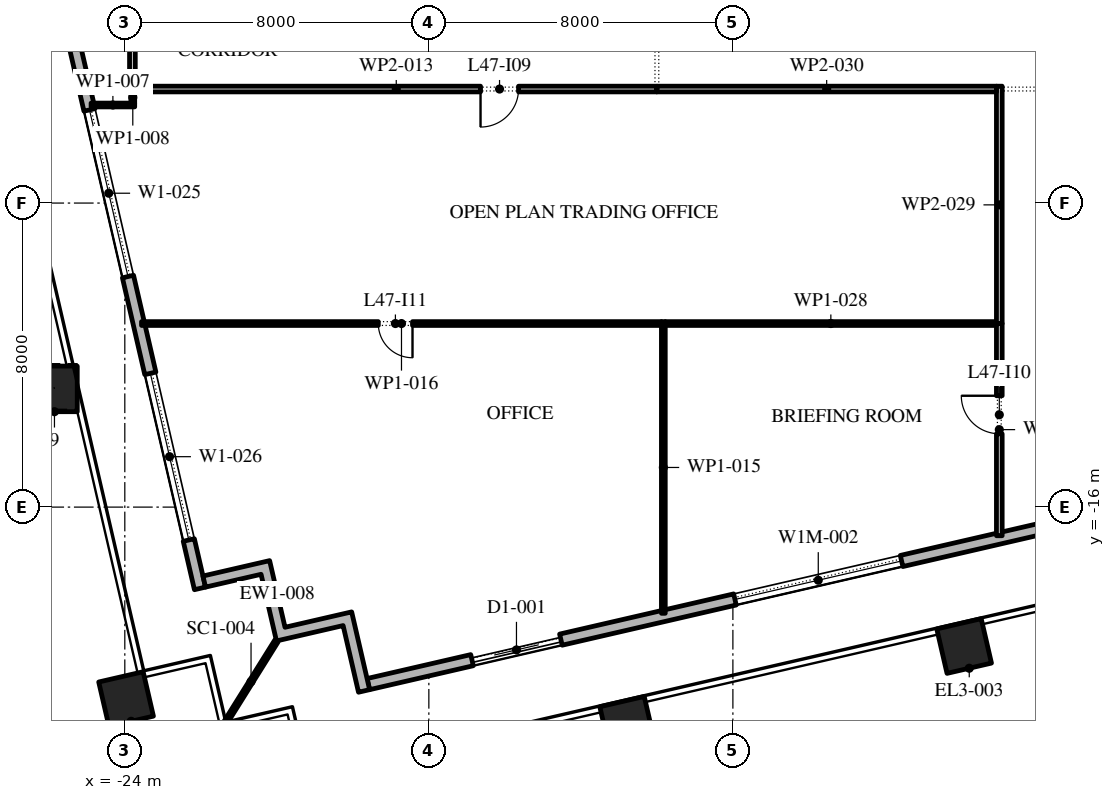
"""IFC4 building model, lengths in metres.
Left out: names, types, materials, properties, quantities, classifications, styles, units other than length and angle.
Written with IfcOpenShell. Run it as: python <this file> out.ifc"""

import sys

from ifc_helpers import new_model, si_unit, direction, frame, frame_2d, origin, origin_2d, place, context, subcontext, project, spatial, polyline, rectangle, outline, extrude, element, fill, save


model = new_model("IFC4")
c1 = context("Model", 3, precision=1e-05, world=origin(), true_north=direction((0.0, 1.0)))
c2 = subcontext(c1, "Body", "Model", "MODEL_VIEW")
j1 = project(units=[si_unit("LENGTHUNIT", "METRE"), si_unit("PLANEANGLEUNIT", "RADIAN")], contexts=[c1])
p1 = place(None, origin())
s1 = spatial("IfcSite", under=j1, at=p1, CompositionType="ELEMENT")
p2 = place(p1, origin())
s2 = spatial("IfcBuilding", under=s1, at=p2, CompositionType="ELEMENT")
p3 = place(p2, frame((0.0, 0.0, 213.6)))
s3 = spatial("IfcBuildingStorey", under=s2, at=p3, CompositionType="ELEMENT", Elevation=213.6)
for number, where, z_axis, x_axis in (
    (1, (-10.782, -21.702, 0.0), (0.0, 0.0, 1.0), (0.974, 0.225, 0.0)),
    (2, (-1.916, -19.655, 0.0), (0.0, 0.0, 1.0), (0.974, 0.225, 0.0)),
):
    element("IfcColumn", number, at=place(p3, frame(where, z_axis=z_axis, x_axis=x_axis)), inside=s3, PredefinedType="COLUMN", context=c2, shape_type="SweptSolid", body=[
        extrude(rectangle(XDim=1.2, YDim=1.2, at=origin_2d()), origin(), (0.0, 0.0, 1.0), 4.2),
    ])
p4 = place(p3, frame((-25.851, -12.89, 0.0), z_axis=(-0.002731884952, 0.01168316756, 0.999928017609), x_axis=(-0.973733900744, -0.227689021567, 0.0)))
e3 = element("IfcColumn", 3, at=p4, inside=s3, PredefinedType="COLUMN", context=c2, shape_type="SweptSolid", body=[
    extrude(rectangle(XDim=1.2, YDim=1.2, at=origin_2d()), origin(), (0.0, 0.0, 1.0), 4.2),
])
p5 = place(p3, frame((-23.967, -21.051, 0.0), z_axis=(0.0, 0.0, 1.0), x_axis=(0.974370064785, 0.224951054344, 0.0)))
e4 = element("IfcColumn", 4, at=p5, inside=s3, PredefinedType="COLUMN", context=c2, shape_type="SweptSolid", body=[
    extrude(rectangle(XDim=1.2, YDim=1.2, at=origin_2d()), origin(), (0.0, 0.0, 1.0), 4.2),
])
p6 = place(p3, frame((-17.592, -20.657, 0.0), z_axis=(0.0, 0.0, 1.0), x_axis=(0.974370243697, 0.224950279389, 0.0)))
e5 = element("IfcWall", 5, at=p6, inside=s3, PredefinedType="STANDARD", context=c2, shape_type="SweptSolid", body=[
    extrude(rectangle(XDim=49.5, YDim=0.3, at=frame_2d((24.75, 0.0))), origin(), (0.0, 0.0, 1.0), 4.0),
])
p7 = place(p6, frame((2.8, 0.0, 0.0)))
e6 = element("IfcOpeningElement", 6, at=p7, cuts=e5, PredefinedType="OPENING", context=c2, shape_type="SweptSolid", body=[
    extrude(rectangle(XDim=2.4, YDim=3.5, at=frame_2d((1.2, 1.75))), frame((0.0, 0.16, 0.0), z_axis=(0.0, -1.0, 0.0), x_axis=(1.0, 0.0, 0.0)), (0.0, 0.0, 1.0), 0.32),
])
p8 = place(p6, frame((9.9, 0.0, 0.45)))
e7 = element("IfcOpeningElement", 7, at=p8, cuts=e5, PredefinedType="OPENING", context=c2, shape_type="SweptSolid", body=[
    extrude(rectangle(XDim=4.5, YDim=2.575, at=frame_2d((2.25, 1.288))), frame((0.0, 0.16, 0.0), z_axis=(0.0, -1.0, 0.0), x_axis=(1.0, 0.0, 0.0)), (0.0, 0.0, 1.0), 0.32),
])
p9 = place(p6, frame((18.2, 0.0, 0.45)))
e8 = element("IfcOpeningElement", 8, at=p9, cuts=e5, PredefinedType="OPENING", context=c2, shape_type="SweptSolid", body=[
    extrude(rectangle(XDim=4.5, YDim=2.675, at=frame_2d((2.25, 1.337))), frame((0.0, 0.16, 0.0), z_axis=(0.0, -1.0, 0.0), x_axis=(1.0, 0.0, 0.0)), (0.0, 0.0, 1.0), 0.32),
])
p10 = place(p6, frame((26.5, 0.0, 0.45)))
e9 = element("IfcOpeningElement", 9, at=p10, cuts=e5, PredefinedType="OPENING", context=c2, shape_type="SweptSolid", body=[
    extrude(rectangle(XDim=4.5, YDim=2.75, at=frame_2d((2.25, 1.375))), frame((0.0, 0.16, 0.0), z_axis=(0.0, -1.0, 0.0), x_axis=(1.0, 0.0, 0.0)), (0.0, 0.0, 1.0), 0.32),
])
p11 = place(p6, frame((36.8, 0.0, 0.0)))
e10 = element("IfcOpeningElement", 10, at=p11, cuts=e5, PredefinedType="OPENING", context=c2, shape_type="SweptSolid", body=[
    extrude(rectangle(XDim=2.4, YDim=3.275, at=frame_2d((1.2, 1.637))), frame((0.0, 0.16, 0.0), z_axis=(0.0, -1.0, 0.0), x_axis=(1.0, 0.0, 0.0)), (0.0, 0.0, 1.0), 0.32),
])
p12 = place(p6, frame((43.1, 0.0, 0.45)))
e11 = element("IfcOpeningElement", 11, at=p12, cuts=e5, PredefinedType="OPENING", context=c2, shape_type="SweptSolid", body=[
    extrude(rectangle(XDim=4.5, YDim=2.875, at=frame_2d((2.25, 1.438))), frame((0.0, 0.16, 0.0), z_axis=(0.0, -1.0, 0.0), x_axis=(1.0, 0.0, 0.0)), (0.0, 0.0, 1.0), 0.32),
])
p13 = place(p3, frame((-33.157, 30.092, 0.0), z_axis=(0.0, 0.0, 1.0), x_axis=(0.224950279389, -0.974370243697, 0.0)))
e12 = element("IfcWall", 12, at=p13, inside=s3, PredefinedType="STANDARD", context=c2, shape_type="SweptSolid", body=[
    extrude(rectangle(XDim=49.5, YDim=0.3, at=frame_2d((24.75, 0.0))), origin(), (0.0, 0.0, 1.0), 4.0),
])
p14 = place(p13, frame((2.207, 0.0, 0.0)))
e13 = element("IfcOpeningElement", 13, at=p14, cuts=e12, PredefinedType="OPENING", context=c2, shape_type="SweptSolid", body=[
    extrude(rectangle(XDim=2.4, YDim=3.5, at=frame_2d((1.2, 1.75))), frame((0.0, 0.16, 0.0), z_axis=(0.0, -1.0, 0.0), x_axis=(1.0, 0.0, 0.0)), (0.0, 0.0, 1.0), 0.32),
])
p15 = place(p13, frame((8.121, 0.0, 0.45)))
e14 = element("IfcOpeningElement", 14, at=p15, cuts=e12, PredefinedType="OPENING", context=c2, shape_type="SweptSolid", body=[
    extrude(rectangle(XDim=4.5, YDim=2.825, at=frame_2d((2.25, 1.413))), frame((0.0, 0.16, 0.0), z_axis=(0.0, -1.0, 0.0), x_axis=(1.0, 0.0, 0.0)), (0.0, 0.0, 1.0), 0.32),
])
p16 = place(p13, frame((15.236, 0.0, 0.45)))
e15 = element("IfcOpeningElement", 15, at=p16, cuts=e12, PredefinedType="OPENING", context=c2, shape_type="SweptSolid", body=[
    extrude(rectangle(XDim=4.5, YDim=2.95, at=frame_2d((2.25, 1.475))), frame((0.0, 0.16, 0.0), z_axis=(0.0, -1.0, 0.0), x_axis=(1.0, 0.0, 0.0)), (0.0, 0.0, 1.0), 0.32),
])
p17 = place(p13, frame((22.35, 0.0, 0.45)))
e16 = element("IfcOpeningElement", 16, at=p17, cuts=e12, PredefinedType="OPENING", context=c2, shape_type="SweptSolid", body=[
    extrude(rectangle(XDim=4.5, YDim=3.0, at=frame_2d((2.25, 1.5))), frame((0.0, 0.16, 0.0), z_axis=(0.0, -1.0, 0.0), x_axis=(1.0, 0.0, 0.0)), (0.0, 0.0, 1.0), 0.32),
])
p18 = place(p13, frame((30.514, 0.0, 0.0)))
e17 = element("IfcOpeningElement", 17, at=p18, cuts=e12, PredefinedType="OPENING", context=c2, shape_type="SweptSolid", body=[
    extrude(rectangle(XDim=2.4, YDim=3.5, at=frame_2d((1.2, 1.75))), frame((0.0, 0.16, 0.0), z_axis=(0.0, -1.0, 0.0), x_axis=(1.0, 0.0, 0.0)), (0.0, 0.0, 1.0), 0.32),
])
p19 = place(p13, frame((36.579, 0.0, 0.45)))
e18 = element("IfcOpeningElement", 18, at=p19, cuts=e12, PredefinedType="OPENING", context=c2, shape_type="SweptSolid", body=[
    extrude(rectangle(XDim=4.5, YDim=3.05, at=frame_2d((2.25, 1.525))), frame((0.0, 0.16, 0.0), z_axis=(0.0, -1.0, 0.0), x_axis=(1.0, 0.0, 0.0)), (0.0, 0.0, 1.0), 0.32),
])
p20 = place(p13, frame((43.693, 0.0, 0.45)))
e19 = element("IfcOpeningElement", 19, at=p20, cuts=e12, PredefinedType="OPENING", context=c2, shape_type="SweptSolid", body=[
    extrude(rectangle(XDim=4.5, YDim=3.05, at=frame_2d((2.25, 1.525))), frame((0.0, 0.16, 0.0), z_axis=(0.0, -1.0, 0.0), x_axis=(1.0, 0.0, 0.0)), (0.0, 0.0, 1.0), 0.32),
])
p21 = place(p3, origin())
e20 = element("IfcWall", 20, at=p21, inside=s3, PredefinedType="STANDARD", context=c2, shape_type="SweptSolid", body=[
    extrude(outline(polyline([(-18.256, -19.117), (-20.01, -19.522), (-20.414, -17.768), (-21.876, -18.105), (-21.943, -17.813), (-20.19, -17.408), (-19.785, -19.162), (-18.031, -18.757), (-17.558, -20.803), (-17.851, -20.871), (-18.256, -19.117)])), origin(), (0.0, 0.0, 1.0), 4.0),
])
p22 = place(p3, frame((-20.01, -19.522, -0.05), z_axis=(0.0, 0.0, 1.0), x_axis=(-0.529920736377, -0.848047176257, 0.0)))
e21 = element("IfcWall", 21, at=p22, inside=s3, PredefinedType="STANDARD", context=c2, shape_type="SweptSolid", body=[
    extrude(rectangle(XDim=2.526, YDim=0.1, at=frame_2d((1.263, 0.0))), origin(), (0.0, 0.0, 1.0), 4.05),
])
p23 = place(p3, frame((-23.8, -5.075, 0.0), z_axis=(0.0, 0.0, 1.0), x_axis=(0.0, 1.0, 0.0)))
e22 = element("IfcWall", 22, at=p23, inside=s3, PredefinedType="PARTITIONING", context=c2, shape_type="SweptSolid", body=[
    extrude(rectangle(XDim=13.525, YDim=0.15, at=frame_2d((6.762, 0.0))), origin(), (0.0, 0.0, 1.0), 4.0),
])
p24 = place(p23, frame((7.625, 0.0, 0.0)))
e23 = element("IfcOpeningElement", 23, at=p24, cuts=e22, PredefinedType="OPENING", context=c2, shape_type="SweptSolid", body=[
    extrude(rectangle(XDim=1.0, YDim=2.1, at=frame_2d((0.5, 1.05))), frame((0.0, 0.085, 0.0), z_axis=(0.0, -1.0, 0.0), x_axis=(1.0, 0.0, 0.0)), (0.0, 0.0, 1.0), 0.17),
])
p25 = place(p3, frame((-23.74, -5.42, 0.0), z_axis=(0.0, 0.0, 1.0), x_axis=(-1.0, 0.0, 0.0)))
e24 = element("IfcWall", 24, at=p25, inside=s3, PredefinedType="PARTITIONING", context=c2, shape_type="SweptSolid", body=[
    extrude(rectangle(XDim=1.147, YDim=0.1, at=frame_2d((0.573, 0.0))), origin(), (0.0, 0.0, 1.0), 4.0),
])
p26 = place(p3, frame((-23.79, -5.075, 0.0), z_axis=(0.0, 0.0, 1.0), x_axis=(0.0, -1.0, 0.0)))
e25 = element("IfcWall", 25, at=p26, inside=s3, PredefinedType="PARTITIONING", context=c2, shape_type="SweptSolid", body=[
    extrude(rectangle(XDim=0.295, YDim=0.1, at=frame_2d((0.147, 0.0))), origin(), (0.0, 0.0, 1.0), 4.0),
])
p27 = place(p3, frame((-10.0, -5.0, 0.0), z_axis=(0.0, 0.0, 1.0), x_axis=(-1.0, 0.0, 0.0)))
e26 = element("IfcWall", 26, at=p27, inside=s3, PredefinedType="PARTITIONING", context=c2, shape_type="SweptSolid", body=[
    extrude(rectangle(XDim=13.715, YDim=0.15, at=frame_2d((6.857, 0.0))), origin(), (0.0, 0.0, 1.0), 4.0),
])
p28 = place(p27, frame((3.64, 0.0, 0.0)))
e27 = element("IfcOpeningElement", 27, at=p28, cuts=e26, PredefinedType="OPENING", context=c2, shape_type="SweptSolid", body=[
    extrude(rectangle(XDim=1.0, YDim=2.1, at=frame_2d((0.5, 1.05))), frame((0.0, 0.085, 0.0), z_axis=(0.0, -1.0, 0.0), x_axis=(1.0, 0.0, 0.0)), (0.0, 0.0, 1.0), 0.17),
])
p29 = place(p3, frame((-9.83, -18.794, 0.0), z_axis=(0.0, 0.0, 1.0), x_axis=(0.0, 1.0, 0.0)))
e28 = element("IfcWall", 28, at=p29, inside=s3, PredefinedType="PARTITIONING", context=c2, shape_type="SweptSolid", body=[
    extrude(rectangle(XDim=7.674, YDim=0.1, at=frame_2d((3.837, 0.0))), origin(), (0.0, 0.0, 1.0), 4.0),
])
p30 = place(p3, frame((-9.88, -11.17, 0.0), z_axis=(0.0, 0.0, 1.0), x_axis=(-1.0, 0.0, 0.0)))
e29 = element("IfcWall", 29, at=p30, inside=s3, PredefinedType="PARTITIONING", context=c2, shape_type="SweptSolid", body=[
    extrude(rectangle(XDim=13.68, YDim=0.1, at=frame_2d((6.84, 0.0))), origin(), (0.0, 0.0, 1.0), 4.0),
])
p31 = place(p30, frame((6.55, 0.0, 0.0)))
e30 = element("IfcOpeningElement", 30, at=p31, cuts=e29, PredefinedType="OPENING", context=c2, shape_type="SweptSolid", body=[
    extrude(rectangle(XDim=0.9, YDim=2.1, at=frame_2d((0.45, 1.05))), frame((0.0, 0.06, 0.0), z_axis=(0.0, -1.0, 0.0), x_axis=(1.0, 0.0, 0.0)), (0.0, 0.0, 1.0), 0.12),
])
p32 = place(p3, frame((-0.99, -16.753, 0.0), z_axis=(0.0, 0.0, 1.0), x_axis=(0.0, 1.0, 0.0)))
e31 = element("IfcWall", 31, at=p32, inside=s3, PredefinedType="PARTITIONING", context=c2, shape_type="SweptSolid", body=[
    extrude(rectangle(XDim=5.583, YDim=0.15, at=frame_2d((2.792, 0.0))), origin(), (0.0, 0.0, 1.0), 4.0),
])
p33 = place(p32, frame((2.683, 0.0, 0.0)))
e32 = element("IfcOpeningElement", 32, at=p33, cuts=e31, PredefinedType="OPENING", context=c2, shape_type="SweptSolid", body=[
    extrude(rectangle(XDim=1.0, YDim=2.1, at=frame_2d((0.5, 1.05))), frame((0.0, 0.085, 0.0), z_axis=(0.0, -1.0, 0.0), x_axis=(1.0, 0.0, 0.0)), (0.0, 0.0, 1.0), 0.17),
])
p34 = place(p3, frame((-1.065, -11.17, 0.0), z_axis=(0.0, 0.0, 1.0), x_axis=(-1.0, 0.0, 0.0)))
e33 = element("IfcWall", 33, at=p34, inside=s3, PredefinedType="PARTITIONING", context=c2, shape_type="SweptSolid", body=[
    extrude(rectangle(XDim=8.715, YDim=0.1, at=frame_2d((4.357, 0.0))), origin(), (0.0, 0.0, 1.0), 4.0),
])
p35 = place(p3, frame((-0.99, -11.17, 0.0), z_axis=(0.0, 0.0, 1.0), x_axis=(0.0, 1.0, 0.0)))
e34 = element("IfcWall", 34, at=p35, inside=s3, PredefinedType="PARTITIONING", context=c2, shape_type="SweptSolid", body=[
    extrude(rectangle(XDim=6.245, YDim=0.15, at=frame_2d((3.123, 0.0))), origin(), (0.0, 0.0, 1.0), 4.0),
])
p36 = place(p3, frame((-1.065, -5.0, 0.0), z_axis=(0.0, 0.0, 1.0), x_axis=(-1.0, 0.0, 0.0)))
e35 = element("IfcWall", 35, at=p36, inside=s3, PredefinedType="PARTITIONING", context=c2, shape_type="SweptSolid", body=[
    extrude(rectangle(XDim=8.935, YDim=0.15, at=frame_2d((4.468, 0.0))), origin(), (0.0, 0.0, 1.0), 4.0),
])
p37 = place(p7, origin())
e36 = element("IfcDoor", 36, at=p37, inside=s3, OperationType="DOUBLE_DOOR_SLIDING", PredefinedType="DOOR", context=c2, shape_type="SweptSolid", body=[
    extrude(rectangle(XDim=2.4, YDim=3.5, at=frame_2d((1.2, 1.75))), frame((0.0, 0.025, 0.0), z_axis=(0.0, -1.0, 0.0), x_axis=(1.0, 0.0, 0.0)), (0.0, 0.0, 1.0), 0.05),
])
fill(e6, e36)
p38 = place(p8, origin())
e37 = element("IfcWindow", 37, at=p38, inside=s3, PartitioningType="DOUBLE_PANEL_VERTICAL", PredefinedType="WINDOW", context=c2, shape_type="SweptSolid", body=[
    extrude(rectangle(XDim=4.5, YDim=2.575, at=frame_2d((2.25, 1.288))), frame((0.0, 0.03, 0.0), z_axis=(0.0, -1.0, 0.0), x_axis=(1.0, 0.0, 0.0)), (0.0, 0.0, 1.0), 0.06),
])
fill(e7, e37)
p39 = place(p19, origin())
e38 = element("IfcWindow", 38, at=p39, inside=s3, PartitioningType="DOUBLE_PANEL_VERTICAL", PredefinedType="WINDOW", context=c2, shape_type="SweptSolid", body=[
    extrude(rectangle(XDim=4.5, YDim=3.05, at=frame_2d((2.25, 1.525))), frame((0.0, 0.03, 0.0), z_axis=(0.0, -1.0, 0.0), x_axis=(1.0, 0.0, 0.0)), (0.0, 0.0, 1.0), 0.06),
])
fill(e18, e38)
p40 = place(p20, origin())
e39 = element("IfcWindow", 39, at=p40, inside=s3, PartitioningType="DOUBLE_PANEL_VERTICAL", PredefinedType="WINDOW", context=c2, shape_type="SweptSolid", body=[
    extrude(rectangle(XDim=4.5, YDim=3.05, at=frame_2d((2.25, 1.525))), frame((0.0, 0.03, 0.0), z_axis=(0.0, -1.0, 0.0), x_axis=(1.0, 0.0, 0.0)), (0.0, 0.0, 1.0), 0.06),
])
fill(e19, e39)
p41 = place(p28, origin())
e40 = element("IfcDoor", 40, at=p41, inside=s3, OperationType="SINGLE_SWING_LEFT", PredefinedType="DOOR", context=c2, shape_type="SweptSolid", body=[
    extrude(rectangle(XDim=1.0, YDim=2.1, at=frame_2d((0.5, 1.05))), frame((0.0, 0.025, 0.0), z_axis=(0.0, -1.0, 0.0), x_axis=(1.0, 0.0, 0.0)), (0.0, 0.0, 1.0), 0.05),
])
fill(e27, e40)
p42 = place(p33, origin())
e41 = element("IfcDoor", 41, at=p42, inside=s3, OperationType="SINGLE_SWING_LEFT", PredefinedType="DOOR", context=c2, shape_type="SweptSolid", body=[
    extrude(rectangle(XDim=1.0, YDim=2.1, at=frame_2d((0.5, 1.05))), frame((0.0, 0.025, 0.0), z_axis=(0.0, -1.0, 0.0), x_axis=(1.0, 0.0, 0.0)), (0.0, 0.0, 1.0), 0.05),
])
fill(e32, e41)
p43 = place(p31, origin())
e42 = element("IfcDoor", 42, at=p43, inside=s3, OperationType="SINGLE_SWING_RIGHT", PredefinedType="DOOR", context=c2, shape_type="SweptSolid", body=[
    extrude(rectangle(XDim=0.9, YDim=2.1, at=frame_2d((0.45, 1.05))), frame((0.0, 0.025, 0.0), z_axis=(0.0, -1.0, 0.0), x_axis=(1.0, 0.0, 0.0)), (0.0, 0.0, 1.0), 0.05),
])
fill(e30, e42)
save(model, sys.argv[1])
